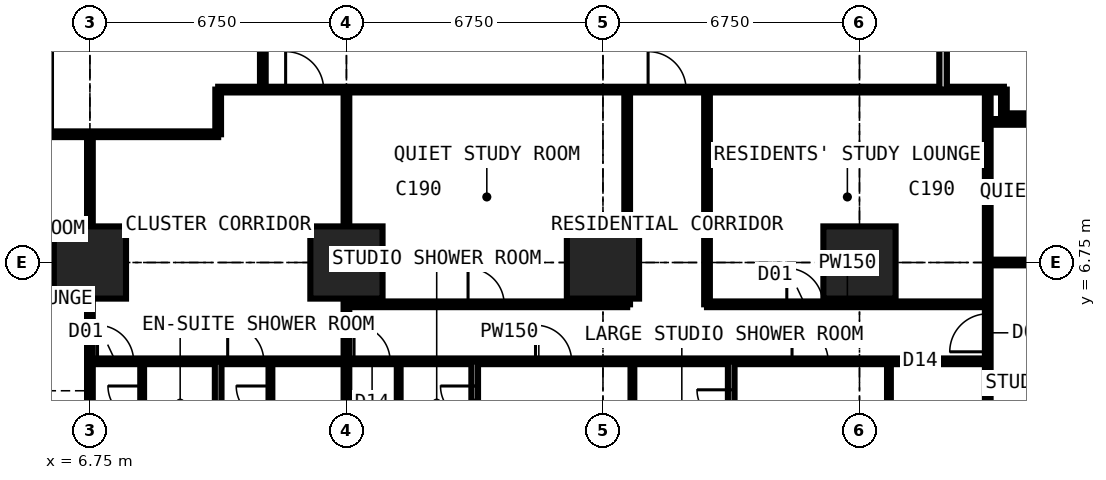
"""IFC4 building model, lengths in metres.
Left out: names, types, materials, properties, quantities, classifications, styles, units other than length and angle.
Written with IfcOpenShell. Run it as: python <this file> out.ifc"""

import sys

from ifc_helpers import new_model, si_unit, direction, frame, frame_2d, origin, origin_2d, place, context, subcontext, project, spatial, rectangle, extrude, element, fill, save


model = new_model("IFC4")
c1 = context("Model", 3, precision=1e-05, world=origin(), true_north=direction((0.0, 1.0)))
c2 = subcontext(c1, "Body", "Model", "MODEL_VIEW")
j1 = project(units=[si_unit("LENGTHUNIT", "METRE"), si_unit("PLANEANGLEUNIT", "RADIAN")], contexts=[c1])
p1 = place(None, origin())
s1 = spatial("IfcSite", under=j1, at=p1, CompositionType="ELEMENT")
p2 = place(p1, origin())
s2 = spatial("IfcBuilding", under=s1, at=p2, CompositionType="ELEMENT")
p3 = place(p2, frame((0.0, 0.0, 25.2)))
s3 = spatial("IfcBuildingStorey", under=s2, at=p3, CompositionType="ELEMENT", Elevation=25.2)
for number, where, z_axis, x_axis in (
    (1, (6.75, 6.75, 0.0), (0.0, 0.0, 1.0), (1.0, 0.0, 0.0)),
    (2, (13.5, 6.75, 0.0), (0.0, 0.0, 1.0), (1.0, 0.0, 0.0)),
    (3, (20.25, 6.75, 0.0), (0.0, 0.0, 1.0), (1.0, 0.0, 0.0)),
    (4, (27.0, 6.75, 0.0), (0.0, 0.0, 1.0), (1.0, 0.0, 0.0)),
):
    element("IfcColumn", number, at=place(p3, frame(where, z_axis=z_axis, x_axis=x_axis)), inside=s3, PredefinedType="COLUMN", context=c2, shape_type="SweptSolid", body=[
        extrude(rectangle(XDim=1.9, YDim=1.9, at=origin_2d()), origin(), (0.0, 0.0, 1.0), 3.6),
    ])
p4 = place(p3, frame((-0.734, 10.125, 0.0), z_axis=(0.0, 0.0, 1.0), x_axis=(1.0, 0.0, 0.0)))
e5 = element("IfcWall", 5, at=p4, inside=s3, PredefinedType="PARTITIONING", context=c2, shape_type="SweptSolid", body=[
    extrude(rectangle(XDim=10.859, YDim=0.15, at=frame_2d((5.429, 0.0))), origin(), (0.0, 0.0, 1.0), 3.375),
])
p5 = place(p4, frame((5.134, 0.0, 0.0)))
e6 = element("IfcOpeningElement", 6, at=p5, cuts=e5, PredefinedType="OPENING", context=c2, shape_type="SweptSolid", body=[
    extrude(rectangle(XDim=1.0, YDim=2.2, at=frame_2d((0.5, 1.1))), frame((0.0, 0.085, 0.0), z_axis=(0.0, -1.0, 0.0), x_axis=(1.0, 0.0, 0.0)), (0.0, 0.0, 1.0), 0.17),
])
p6 = place(p3, frame((6.75, -0.734, 0.0), z_axis=(0.0, 0.0, 1.0), x_axis=(0.0, 1.0, 0.0)))
e7 = element("IfcWall", 7, at=p6, inside=s3, PredefinedType="PARTITIONING", context=c2, shape_type="SweptSolid", body=[
    extrude(rectangle(XDim=10.859, YDim=0.15, at=frame_2d((5.429, 0.0))), origin(), (0.0, 0.0, 1.0), 2.877),
])
p7 = place(p3, frame((6.75, 4.15, 0.0), z_axis=(0.0, 0.0, 1.0), x_axis=(1.0, 0.0, 0.0)))
e8 = element("IfcWall", 8, at=p7, inside=s3, PredefinedType="PARTITIONING", context=c2, shape_type="SweptSolid", body=[
    extrude(rectangle(XDim=23.625, YDim=0.15, at=frame_2d((11.812, 0.0))), origin(), (0.0, 0.0, 1.0), 3.375),
])
p8 = place(p7, frame((0.2, 0.0, 0.0)))
e9 = element("IfcOpeningElement", 9, at=p8, cuts=e8, PredefinedType="OPENING", context=c2, shape_type="SweptSolid", body=[
    extrude(rectangle(XDim=0.95, YDim=2.2, at=frame_2d((0.475, 1.1))), frame((0.0, 0.085, 0.0), z_axis=(0.0, -1.0, 0.0), x_axis=(1.0, 0.0, 0.0)), (0.0, 0.0, 1.0), 0.17),
])
p9 = place(p7, frame((3.625, 0.0, 0.0)))
e10 = element("IfcOpeningElement", 10, at=p9, cuts=e8, PredefinedType="OPENING", context=c2, shape_type="SweptSolid", body=[
    extrude(rectangle(XDim=0.95, YDim=2.2, at=frame_2d((0.475, 1.1))), frame((0.0, 0.085, 0.0), z_axis=(0.0, -1.0, 0.0), x_axis=(1.0, 0.0, 0.0)), (0.0, 0.0, 1.0), 0.17),
])
p10 = place(p7, frame((18.475, 0.0, 0.0)))
e11 = element("IfcOpeningElement", 11, at=p10, cuts=e8, PredefinedType="OPENING", context=c2, shape_type="SweptSolid", body=[
    extrude(rectangle(XDim=0.95, YDim=2.2, at=frame_2d((0.475, 1.1))), frame((0.0, 0.085, 0.0), z_axis=(0.0, -1.0, 0.0), x_axis=(1.0, 0.0, 0.0)), (0.0, 0.0, 1.0), 0.17),
])
p11 = place(p7, frame((11.725, 0.0, 0.0)))
e12 = element("IfcOpeningElement", 12, at=p11, cuts=e8, PredefinedType="OPENING", context=c2, shape_type="SweptSolid", body=[
    extrude(rectangle(XDim=0.95, YDim=2.2, at=frame_2d((0.475, 1.1))), frame((0.0, 0.085, 0.0), z_axis=(0.0, -1.0, 0.0), x_axis=(1.0, 0.0, 0.0)), (0.0, 0.0, 1.0), 0.17),
])
p12 = place(p7, frame((6.95, 0.0, 0.0)))
e13 = element("IfcOpeningElement", 13, at=p12, cuts=e8, PredefinedType="OPENING", context=c2, shape_type="SweptSolid", body=[
    extrude(rectangle(XDim=0.95, YDim=2.2, at=frame_2d((0.475, 1.1))), frame((0.0, 0.085, 0.0), z_axis=(0.0, -1.0, 0.0), x_axis=(1.0, 0.0, 0.0)), (0.0, 0.0, 1.0), 0.17),
])
p13 = place(p3, frame((8.125, 1.95, 0.0), z_axis=(0.0, 0.0, 1.0), x_axis=(0.0, 1.0, 0.0)))
e14 = element("IfcWall", 14, at=p13, inside=s3, PredefinedType="PARTITIONING", context=c2, shape_type="SweptSolid", body=[
    extrude(rectangle(XDim=2.2, YDim=0.1, at=frame_2d((1.1, 0.0))), origin(), (0.0, 0.0, 1.0), 3.375),
])
p14 = place(p13, frame((0.65, 0.0, 0.0)))
e15 = element("IfcOpeningElement", 15, at=p14, cuts=e14, PredefinedType="OPENING", context=c2, shape_type="SweptSolid", body=[
    extrude(rectangle(XDim=0.9, YDim=2.2, at=frame_2d((0.45, 1.1))), frame((0.0, 0.06, 0.0), z_axis=(0.0, -1.0, 0.0), x_axis=(1.0, 0.0, 0.0)), (0.0, 0.0, 1.0), 0.12),
])
p15 = place(p3, frame((10.125, -0.734, 0.0), z_axis=(0.0, 0.0, 1.0), x_axis=(0.0, 1.0, 0.0)))
e16 = element("IfcWall", 16, at=p15, inside=s3, PredefinedType="PARTITIONING", context=c2, shape_type="SweptSolid", body=[
    extrude(rectangle(XDim=4.884, YDim=0.175, at=frame_2d((2.442, 0.0))), origin(), (0.0, 0.0, 1.0), 3.375),
])
p16 = place(p3, frame((10.125, 10.125, 0.0), z_axis=(0.0, 0.0, 1.0), x_axis=(0.0, 1.0, 0.0)))
e17 = element("IfcWall", 17, at=p16, inside=s3, PredefinedType="PARTITIONING", context=c2, shape_type="SweptSolid", body=[
    extrude(rectangle(XDim=1.175, YDim=0.15, at=frame_2d((0.587, 0.0))), origin(), (0.0, 0.0, 1.0), 3.375),
])
p17 = place(p3, frame((10.125, 11.3, 0.0), z_axis=(0.0, 0.0, 1.0), x_axis=(1.0, 0.0, 0.0)))
e18 = element("IfcWall", 18, at=p17, inside=s3, PredefinedType="PARTITIONING", context=c2, shape_type="SweptSolid", body=[
    extrude(rectangle(XDim=20.675, YDim=0.15, at=frame_2d((10.337, 0.0))), origin(), (0.0, 0.0, 1.0), 3.375),
])
p18 = place(p17, frame((1.775, 0.0, 0.0)))
e19 = element("IfcOpeningElement", 19, at=p18, cuts=e18, PredefinedType="OPENING", context=c2, shape_type="SweptSolid", body=[
    extrude(rectangle(XDim=1.0, YDim=2.2, at=frame_2d((0.5, 1.1))), frame((0.0, 0.085, 0.0), z_axis=(0.0, -1.0, 0.0), x_axis=(1.0, 0.0, 0.0)), (0.0, 0.0, 1.0), 0.17),
])
p19 = place(p17, frame((11.312, 0.0, 0.0)))
e20 = element("IfcOpeningElement", 20, at=p19, cuts=e18, PredefinedType="OPENING", context=c2, shape_type="SweptSolid", body=[
    extrude(rectangle(XDim=1.0, YDim=2.2, at=frame_2d((0.5, 1.1))), frame((0.0, 0.085, 0.0), z_axis=(0.0, -1.0, 0.0), x_axis=(1.0, 0.0, 0.0)), (0.0, 0.0, 1.0), 0.17),
])
p20 = place(p3, frame((11.3, 11.3, 0.0), z_axis=(0.0, 0.0, 1.0), x_axis=(0.0, 1.0, 0.0)))
e21 = element("IfcWall", 21, at=p20, inside=s3, PredefinedType="PARTITIONING", context=c2, shape_type="SweptSolid", body=[
    extrude(rectangle(XDim=19.075, YDim=0.15, at=frame_2d((9.538, 0.0))), origin(), (0.0, 0.0, 1.0), 3.375),
])
p21 = place(p20, frame((10.137, 0.0, 0.0)))
e22 = element("IfcOpeningElement", 22, at=p21, cuts=e21, PredefinedType="OPENING", context=c2, shape_type="SweptSolid", body=[
    extrude(rectangle(XDim=1.0, YDim=2.2, at=frame_2d((0.5, 1.1))), frame((0.0, 0.085, 0.0), z_axis=(0.0, -1.0, 0.0), x_axis=(1.0, 0.0, 0.0)), (0.0, 0.0, 1.0), 0.17),
])
p22 = place(p3, frame((11.5, 1.95, 0.0), z_axis=(0.0, 0.0, 1.0), x_axis=(0.0, 1.0, 0.0)))
e23 = element("IfcWall", 23, at=p22, inside=s3, PredefinedType="PARTITIONING", context=c2, shape_type="SweptSolid", body=[
    extrude(rectangle(XDim=2.2, YDim=0.1, at=frame_2d((1.1, 0.0))), origin(), (0.0, 0.0, 1.0), 3.375),
])
p23 = place(p22, frame((0.65, 0.0, 0.0)))
e24 = element("IfcOpeningElement", 24, at=p23, cuts=e23, PredefinedType="OPENING", context=c2, shape_type="SweptSolid", body=[
    extrude(rectangle(XDim=0.9, YDim=2.2, at=frame_2d((0.45, 1.1))), frame((0.0, 0.06, 0.0), z_axis=(0.0, -1.0, 0.0), x_axis=(1.0, 0.0, 0.0)), (0.0, 0.0, 1.0), 0.12),
])
p24 = place(p3, frame((13.5, -0.734, 0.0), z_axis=(0.0, 0.0, 1.0), x_axis=(0.0, 1.0, 0.0)))
e25 = element("IfcWall", 25, at=p24, inside=s3, PredefinedType="PARTITIONING", context=c2, shape_type="SweptSolid", body=[
    extrude(rectangle(XDim=12.034, YDim=0.15, at=frame_2d((6.017, 0.0))), origin(), (0.0, 0.0, 1.0), 2.877),
])
p25 = place(p3, frame((13.5, 5.65, 0.0), z_axis=(0.0, 0.0, 1.0), x_axis=(1.0, 0.0, 0.0)))
e26 = element("IfcWall", 26, at=p25, inside=s3, PredefinedType="PARTITIONING", context=c2, shape_type="SweptSolid", body=[
    extrude(rectangle(XDim=7.387, YDim=0.15, at=frame_2d((3.694, 0.0))), origin(), (0.0, 0.0, 1.0), 3.375),
])
p26 = place(p25, frame((3.2, 0.0, 0.0)))
e27 = element("IfcOpeningElement", 27, at=p26, cuts=e26, PredefinedType="OPENING", context=c2, shape_type="SweptSolid", body=[
    extrude(rectangle(XDim=0.95, YDim=2.2, at=frame_2d((0.475, 1.1))), frame((0.0, 0.085, 0.0), z_axis=(0.0, -1.0, 0.0), x_axis=(1.0, 0.0, 0.0)), (0.0, 0.0, 1.0), 0.17),
])
p27 = place(p3, frame((14.875, 1.95, 0.0), z_axis=(0.0, 0.0, 1.0), x_axis=(0.0, 1.0, 0.0)))
e28 = element("IfcWall", 28, at=p27, inside=s3, PredefinedType="PARTITIONING", context=c2, shape_type="SweptSolid", body=[
    extrude(rectangle(XDim=2.2, YDim=0.1, at=frame_2d((1.1, 0.0))), origin(), (0.0, 0.0, 1.0), 3.375),
])
p28 = place(p3, frame((16.875, -0.734, 0.0), z_axis=(0.0, 0.0, 1.0), x_axis=(0.0, 1.0, 0.0)))
e29 = element("IfcWall", 29, at=p28, inside=s3, PredefinedType="PARTITIONING", context=c2, shape_type="SweptSolid", body=[
    extrude(rectangle(XDim=4.884, YDim=0.175, at=frame_2d((2.442, 0.0))), origin(), (0.0, 0.0, 1.0), 3.375),
])
p29 = place(p28, frame((3.334, 0.0, 0.0)))
e30 = element("IfcOpeningElement", 30, at=p29, cuts=e29, PredefinedType="OPENING", context=c2, shape_type="SweptSolid", body=[
    extrude(rectangle(XDim=0.9, YDim=2.2, at=frame_2d((0.45, 1.1))), frame((0.0, 0.097, 0.0), z_axis=(0.0, -1.0, 0.0), x_axis=(1.0, 0.0, 0.0)), (0.0, 0.0, 1.0), 0.195),
])
p30 = place(p3, frame((20.887, 5.65, 0.0), z_axis=(0.0, 0.0, 1.0), x_axis=(0.0, 1.0, 0.0)))
e31 = element("IfcWall", 31, at=p30, inside=s3, PredefinedType="PARTITIONING", context=c2, shape_type="SweptSolid", body=[
    extrude(rectangle(XDim=5.65, YDim=0.15, at=frame_2d((2.825, 0.0))), origin(), (0.0, 0.0, 1.0), 3.375),
])
p31 = place(p3, frame((21.025, 1.75, 0.0), z_axis=(0.0, 0.0, 1.0), x_axis=(0.0, 1.0, 0.0)))
e32 = element("IfcWall", 32, at=p31, inside=s3, PredefinedType="PARTITIONING", context=c2, shape_type="SweptSolid", body=[
    extrude(rectangle(XDim=2.4, YDim=0.1, at=frame_2d((1.2, 0.0))), origin(), (0.0, 0.0, 1.0), 3.375),
])
p32 = place(p3, frame((22.988, 5.65, 0.0), z_axis=(0.0, 0.0, 1.0), x_axis=(1.0, 0.0, 0.0)))
e33 = element("IfcWall", 33, at=p32, inside=s3, PredefinedType="PARTITIONING", context=c2, shape_type="SweptSolid", body=[
    extrude(rectangle(XDim=7.387, YDim=0.15, at=frame_2d((3.694, 0.0))), origin(), (0.0, 0.0, 1.0), 3.375),
])
p33 = place(p32, frame((2.1, 0.0, 0.0)))
e34 = element("IfcOpeningElement", 34, at=p33, cuts=e33, PredefinedType="OPENING", context=c2, shape_type="SweptSolid", body=[
    extrude(rectangle(XDim=0.95, YDim=2.2, at=frame_2d((0.475, 1.1))), frame((0.0, 0.085, 0.0), z_axis=(0.0, -1.0, 0.0), x_axis=(1.0, 0.0, 0.0)), (0.0, 0.0, 1.0), 0.17),
])
p34 = place(p3, frame((22.988, 5.65, 0.0), z_axis=(0.0, 0.0, 1.0), x_axis=(0.0, 1.0, 0.0)))
e35 = element("IfcWall", 35, at=p34, inside=s3, PredefinedType="PARTITIONING", context=c2, shape_type="SweptSolid", body=[
    extrude(rectangle(XDim=5.65, YDim=0.15, at=frame_2d((2.825, 0.0))), origin(), (0.0, 0.0, 1.0), 3.375),
])
p35 = place(p3, frame((23.625, -0.734, 0.0), z_axis=(0.0, 0.0, 1.0), x_axis=(0.0, 1.0, 0.0)))
e36 = element("IfcWall", 36, at=p35, inside=s3, PredefinedType="PARTITIONING", context=c2, shape_type="SweptSolid", body=[
    extrude(rectangle(XDim=4.884, YDim=0.175, at=frame_2d((2.442, 0.0))), origin(), (0.0, 0.0, 1.0), 3.375),
])
p36 = place(p35, frame((3.234, 0.0, 0.0)))
e37 = element("IfcOpeningElement", 37, at=p36, cuts=e36, PredefinedType="OPENING", context=c2, shape_type="SweptSolid", body=[
    extrude(rectangle(XDim=0.9, YDim=2.2, at=frame_2d((0.45, 1.1))), frame((0.0, 0.097, 0.0), z_axis=(0.0, -1.0, 0.0), x_axis=(1.0, 0.0, 0.0)), (0.0, 0.0, 1.0), 0.195),
])
p37 = place(p3, frame((27.775, 1.75, 0.0), z_axis=(0.0, 0.0, 1.0), x_axis=(0.0, 1.0, 0.0)))
e38 = element("IfcWall", 38, at=p37, inside=s3, PredefinedType="PARTITIONING", context=c2, shape_type="SweptSolid", body=[
    extrude(rectangle(XDim=2.4, YDim=0.1, at=frame_2d((1.2, 0.0))), origin(), (0.0, 0.0, 1.0), 3.375),
])
p38 = place(p3, frame((29.2, 11.3, 0.0), z_axis=(0.0, 0.0, 1.0), x_axis=(0.0, 1.0, 0.0)))
e39 = element("IfcWall", 39, at=p38, inside=s3, PredefinedType="PARTITIONING", context=c2, shape_type="SweptSolid", body=[
    extrude(rectangle(XDim=17.9, YDim=0.2, at=frame_2d((8.95, 0.0))), origin(), (0.0, 0.0, 1.0), 3.375),
])
p39 = place(p38, frame((8.35, 0.0, 0.0)))
e40 = element("IfcOpeningElement", 40, at=p39, cuts=e39, PredefinedType="OPENING", context=c2, shape_type="SweptSolid", body=[
    extrude(rectangle(XDim=1.2, YDim=2.2, at=frame_2d((0.6, 1.1))), frame((0.0, 0.11, 0.0), z_axis=(0.0, -1.0, 0.0), x_axis=(1.0, 0.0, 0.0)), (0.0, 0.0, 1.0), 0.22),
])
p40 = place(p3, frame((30.375, -0.734, 0.0), z_axis=(0.0, 0.0, 1.0), x_axis=(0.0, 1.0, 0.0)))
e41 = element("IfcWall", 41, at=p40, inside=s3, PredefinedType="PARTITIONING", context=c2, shape_type="SweptSolid", body=[
    extrude(rectangle(XDim=12.034, YDim=0.15, at=frame_2d((6.017, 0.0))), origin(), (0.0, 0.0, 1.0), 3.375),
])
p41 = place(p40, frame((5.134, 0.0, 0.0)))
e42 = element("IfcOpeningElement", 42, at=p41, cuts=e41, PredefinedType="OPENING", context=c2, shape_type="SweptSolid", body=[
    extrude(rectangle(XDim=1.0, YDim=2.2, at=frame_2d((0.5, 1.1))), frame((0.0, 0.085, 0.0), z_axis=(0.0, -1.0, 0.0), x_axis=(1.0, 0.0, 0.0)), (0.0, 0.0, 1.0), 0.17),
])
p42 = place(p3, frame((30.375, 6.75, 0.0), z_axis=(0.0, 0.0, 1.0), x_axis=(1.0, 0.0, 0.0)))
e43 = element("IfcWall", 43, at=p42, inside=s3, PredefinedType="PARTITIONING", context=c2, shape_type="SweptSolid", body=[
    extrude(rectangle(XDim=5.975, YDim=0.15, at=frame_2d((2.988, 0.0))), origin(), (0.0, 0.0, 1.0), 2.877),
])
p43 = place(p3, frame((30.375, 10.45, 0.0), z_axis=(0.0, 0.0, 1.0), x_axis=(1.0, 0.0, 0.0)))
e44 = element("IfcWall", 44, at=p43, inside=s3, PredefinedType="PARTITIONING", context=c2, shape_type="SweptSolid", body=[
    extrude(rectangle(XDim=4.475, YDim=0.15, at=frame_2d((2.238, 0.0))), origin(), (0.0, 0.0, 1.0), 3.375),
])
p44 = place(p43, frame((2.35, 0.0, 0.0)))
e45 = element("IfcOpeningElement", 45, at=p44, cuts=e44, PredefinedType="OPENING", context=c2, shape_type="SweptSolid", body=[
    extrude(rectangle(XDim=0.95, YDim=2.2, at=frame_2d((0.475, 1.1))), frame((0.0, 0.085, 0.0), z_axis=(0.0, -1.0, 0.0), x_axis=(1.0, 0.0, 0.0)), (0.0, 0.0, 1.0), 0.17),
])
p45 = place(p3, frame((30.8, 10.6, 0.0), z_axis=(0.0, 0.0, 1.0), x_axis=(0.0, 1.0, 0.0)))
e46 = element("IfcWall", 46, at=p45, inside=s3, PredefinedType="PARTITIONING", context=c2, shape_type="SweptSolid", body=[
    extrude(rectangle(XDim=0.7, YDim=0.15, at=frame_2d((0.35, 0.0))), origin(), (0.0, 0.0, 1.0), 3.375),
])
p46 = place(p3, frame((30.8, 10.6, 0.0), z_axis=(0.0, 0.0, 1.0), x_axis=(1.0, 0.0, 0.0)))
e47 = element("IfcWall", 47, at=p46, inside=s3, PredefinedType="PARTITIONING", context=c2, shape_type="SweptSolid", body=[
    extrude(rectangle(XDim=1.85, YDim=0.15, at=frame_2d((0.925, 0.0))), origin(), (0.0, 0.0, 1.0), 3.375),
])
p47 = place(p8, origin())
e48 = element("IfcDoor", 48, at=p47, inside=s3, OperationType="SINGLE_SWING_LEFT", PredefinedType="DOOR", context=c2, shape_type="SweptSolid", body=[
    extrude(rectangle(XDim=0.95, YDim=2.2, at=frame_2d((0.475, 1.1))), frame((0.0, 0.025, 0.0), z_axis=(0.0, -1.0, 0.0), x_axis=(1.0, 0.0, 0.0)), (0.0, 0.0, 1.0), 0.05),
])
fill(e9, e48)
p48 = place(p14, origin())
e49 = element("IfcDoor", 49, at=p48, inside=s3, OperationType="SINGLE_SWING_RIGHT", PredefinedType="DOOR", context=c2, shape_type="SweptSolid", body=[
    extrude(rectangle(XDim=0.9, YDim=2.2, at=frame_2d((0.45, 1.1))), frame((0.0, 0.025, 0.0), z_axis=(0.0, -1.0, 0.0), x_axis=(1.0, 0.0, 0.0)), (0.0, 0.0, 1.0), 0.05),
])
fill(e15, e49)
p49 = place(p9, origin())
e50 = element("IfcDoor", 50, at=p49, inside=s3, OperationType="SINGLE_SWING_LEFT", PredefinedType="DOOR", context=c2, shape_type="SweptSolid", body=[
    extrude(rectangle(XDim=0.95, YDim=2.2, at=frame_2d((0.475, 1.1))), frame((0.0, 0.025, 0.0), z_axis=(0.0, -1.0, 0.0), x_axis=(1.0, 0.0, 0.0)), (0.0, 0.0, 1.0), 0.05),
])
fill(e10, e50)
p50 = place(p23, origin())
e51 = element("IfcDoor", 51, at=p50, inside=s3, OperationType="SINGLE_SWING_RIGHT", PredefinedType="DOOR", context=c2, shape_type="SweptSolid", body=[
    extrude(rectangle(XDim=0.9, YDim=2.2, at=frame_2d((0.45, 1.1))), frame((0.0, 0.025, 0.0), z_axis=(0.0, -1.0, 0.0), x_axis=(1.0, 0.0, 0.0)), (0.0, 0.0, 1.0), 0.05),
])
fill(e24, e51)
p51 = place(p18, origin())
e52 = element("IfcDoor", 52, at=p51, inside=s3, OperationType="SINGLE_SWING_LEFT", PredefinedType="DOOR", context=c2, shape_type="SweptSolid", body=[
    extrude(rectangle(XDim=1.0, YDim=2.2, at=frame_2d((0.5, 1.1))), frame((0.0, 0.025, 0.0), z_axis=(0.0, -1.0, 0.0), x_axis=(1.0, 0.0, 0.0)), (0.0, 0.0, 1.0), 0.05),
])
fill(e19, e52)
p52 = place(p10, origin())
e53 = element("IfcDoor", 53, at=p52, inside=s3, OperationType="SINGLE_SWING_LEFT", PredefinedType="DOOR", context=c2, shape_type="SweptSolid", body=[
    extrude(rectangle(XDim=0.95, YDim=2.2, at=frame_2d((0.475, 1.1))), frame((0.0, 0.025, 0.0), z_axis=(0.0, -1.0, 0.0), x_axis=(1.0, 0.0, 0.0)), (0.0, 0.0, 1.0), 0.05),
])
fill(e11, e53)
p53 = place(p11, origin())
e54 = element("IfcDoor", 54, at=p53, inside=s3, OperationType="SINGLE_SWING_LEFT", PredefinedType="DOOR", context=c2, shape_type="SweptSolid", body=[
    extrude(rectangle(XDim=0.95, YDim=2.2, at=frame_2d((0.475, 1.1))), frame((0.0, 0.025, 0.0), z_axis=(0.0, -1.0, 0.0), x_axis=(1.0, 0.0, 0.0)), (0.0, 0.0, 1.0), 0.05),
])
fill(e12, e54)
p54 = place(p36, origin())
e55 = element("IfcDoor", 55, at=p54, inside=s3, OperationType="SINGLE_SWING_RIGHT", PredefinedType="DOOR", context=c2, shape_type="SweptSolid", body=[
    extrude(rectangle(XDim=0.9, YDim=2.2, at=frame_2d((0.45, 1.1))), frame((0.0, 0.025, 0.0), z_axis=(0.0, -1.0, 0.0), x_axis=(1.0, 0.0, 0.0)), (0.0, 0.0, 1.0), 0.05),
])
fill(e37, e55)
p55 = place(p12, origin())
e56 = element("IfcDoor", 56, at=p55, inside=s3, OperationType="SINGLE_SWING_LEFT", PredefinedType="DOOR", context=c2, shape_type="SweptSolid", body=[
    extrude(rectangle(XDim=0.95, YDim=2.2, at=frame_2d((0.475, 1.1))), frame((0.0, 0.025, 0.0), z_axis=(0.0, -1.0, 0.0), x_axis=(1.0, 0.0, 0.0)), (0.0, 0.0, 1.0), 0.05),
])
fill(e13, e56)
p56 = place(p29, origin())
e57 = element("IfcDoor", 57, at=p56, inside=s3, OperationType="SINGLE_SWING_RIGHT", PredefinedType="DOOR", context=c2, shape_type="SweptSolid", body=[
    extrude(rectangle(XDim=0.9, YDim=2.2, at=frame_2d((0.45, 1.1))), frame((0.0, 0.025, 0.0), z_axis=(0.0, -1.0, 0.0), x_axis=(1.0, 0.0, 0.0)), (0.0, 0.0, 1.0), 0.05),
])
fill(e30, e57)
p57 = place(p19, origin())
e58 = element("IfcDoor", 58, at=p57, inside=s3, OperationType="SINGLE_SWING_LEFT", PredefinedType="DOOR", context=c2, shape_type="SweptSolid", body=[
    extrude(rectangle(XDim=1.0, YDim=2.2, at=frame_2d((0.5, 1.1))), frame((0.0, 0.025, 0.0), z_axis=(0.0, -1.0, 0.0), x_axis=(1.0, 0.0, 0.0)), (0.0, 0.0, 1.0), 0.05),
])
fill(e20, e58)
p58 = place(p33, origin())
e59 = element("IfcDoor", 59, at=p58, inside=s3, OperationType="SINGLE_SWING_LEFT", PredefinedType="DOOR", context=c2, shape_type="SweptSolid", body=[
    extrude(rectangle(XDim=0.95, YDim=2.2, at=frame_2d((0.475, 1.1))), frame((0.0, 0.025, 0.0), z_axis=(0.0, -1.0, 0.0), x_axis=(1.0, 0.0, 0.0)), (0.0, 0.0, 1.0), 0.05),
])
fill(e34, e59)
p59 = place(p26, origin())
e60 = element("IfcDoor", 60, at=p59, inside=s3, OperationType="SINGLE_SWING_LEFT", PredefinedType="DOOR", context=c2, shape_type="SweptSolid", body=[
    extrude(rectangle(XDim=0.95, YDim=2.2, at=frame_2d((0.475, 1.1))), frame((0.0, 0.025, 0.0), z_axis=(0.0, -1.0, 0.0), x_axis=(1.0, 0.0, 0.0)), (0.0, 0.0, 1.0), 0.05),
])
fill(e27, e60)
p60 = place(p41, origin())
e61 = element("IfcDoor", 61, at=p60, inside=s3, OperationType="SINGLE_SWING_LEFT", PredefinedType="DOOR", context=c2, shape_type="SweptSolid", body=[
    extrude(rectangle(XDim=1.0, YDim=2.2, at=frame_2d((0.5, 1.1))), frame((0.0, 0.025, 0.0), z_axis=(0.0, -1.0, 0.0), x_axis=(1.0, 0.0, 0.0)), (0.0, 0.0, 1.0), 0.05),
])
fill(e42, e61)
save(model, sys.argv[1])
